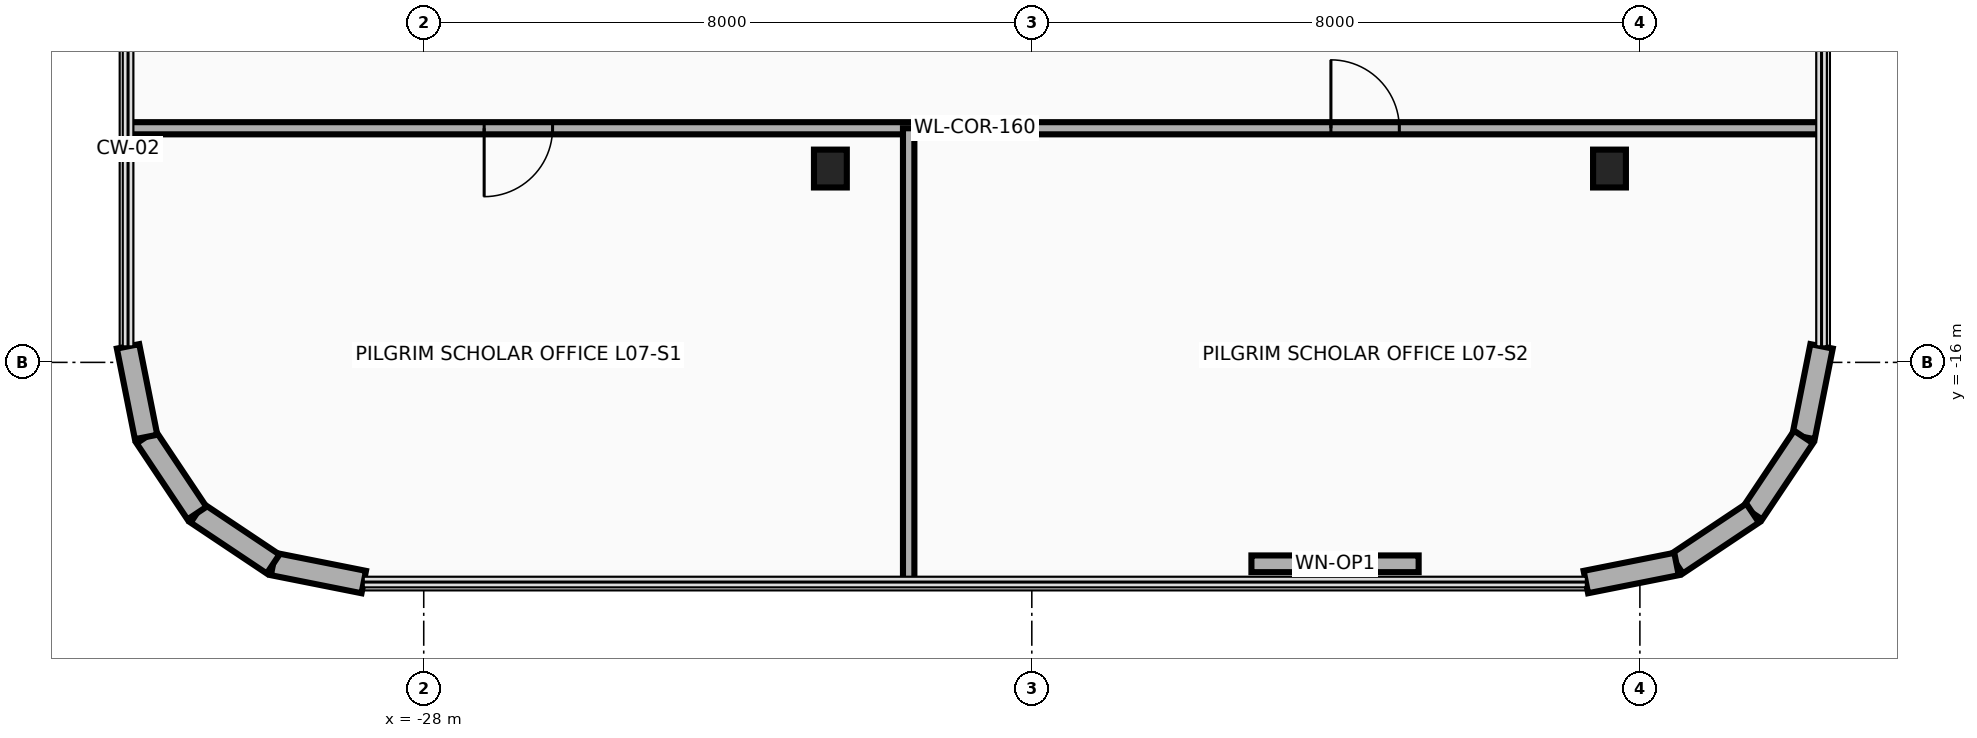
"""IFC4 building model, lengths in metres.
Left out: names, types, materials, properties, quantities, classifications, styles, units other than length and angle.
Written with IfcOpenShell. Run it as: python <this file> out.ifc"""

import sys

from ifc_helpers import new_model, si_unit, direction, frame, frame_2d, origin, origin_2d, place, context, subcontext, project, spatial, rectangle, i_section, extrude, source, transform, mapped, element, fill, save


model = new_model("IFC4")
c1 = context("Model", 3, precision=1e-05, world=origin(), true_north=direction((0.0, 1.0)))
c2 = subcontext(c1, "Body", "Model", "MODEL_VIEW")
j1 = project(units=[si_unit("LENGTHUNIT", "METRE"), si_unit("PLANEANGLEUNIT", "RADIAN")], contexts=[c1])
p1 = place(None, origin())
s1 = spatial("IfcSite", under=j1, at=p1, CompositionType="ELEMENT")
p2 = place(p1, origin())
s2 = spatial("IfcBuilding", under=s1, at=p2, CompositionType="ELEMENT")
p3 = place(p2, frame((0.0, 0.0, 33.4)))
s3 = spatial("IfcBuildingStorey", under=s2, at=p3, CompositionType="ELEMENT", Elevation=33.4)
m1 = source(origin(), c2, "Body", "SweptSolid", [
    extrude(i_section(OverallWidth=0.432, OverallDepth=0.498, WebThickness=0.056, FlangeThickness=0.089, at=origin_2d()), origin(), (0.0, 0.0, 1.0), 3.7),
])
for number, where, z_axis, x_axis in (
    (1, (-22.65, -13.45, 0.0), (0.0, 0.0, 1.0), (1.0, 0.0, 0.0)),
    (2, (-12.4, -13.45, 0.0), (0.0, 0.0, 1.0), (1.0, 0.0, 0.0)),
):
    element("IfcColumn", number, at=place(p3, frame(where, z_axis=z_axis, x_axis=x_axis)), inside=s3, PredefinedType="COLUMN", context=c2, shape_type="MappedRepresentation", body=[
        mapped(m1, transform((0.0, 0.0, 0.0), x_axis=(1.0, 0.0, 0.0), y_axis=(0.0, 1.0, 0.0), z_axis=(0.0, 0.0, 1.0), scale=1.0)),
    ])
p4 = place(p3, frame((-9.61, -15.789, 0.0), z_axis=(0.0, 0.0, 1.0), x_axis=(-0.194996050505, -0.980804027463, 0.0)))
e3 = element("IfcWall", 3, at=p4, inside=s3, PredefinedType="SOLIDWALL", context=c2, shape_type="SweptSolid", body=[
    extrude(rectangle(XDim=1.216, YDim=0.3, at=frame_2d((0.608, 0.0))), origin(), (0.0, 0.0, 1.0), 3.46),
])
for number, where, z_axis, x_axis in (
    (4, (-9.847, -16.982, 0.0), (0.0, 0.0, 1.0), (-0.556, -0.831, 0.0)),
    (5, (-10.517, -17.983, 0.0), (0.0, 0.0, 1.0), (-0.831, -0.556, 0.0)),
):
    element("IfcWall", number, at=place(p3, frame(where, z_axis=z_axis, x_axis=x_axis)), inside=s3, PredefinedType="SOLIDWALL", context=c2, shape_type="SweptSolid", body=[
        extrude(rectangle(XDim=1.205, YDim=0.3, at=frame_2d((0.603, 0.0))), origin(), (0.0, 0.0, 1.0), 3.46),
    ])
p5 = place(p3, frame((-11.518, -18.653, 0.0), z_axis=(0.0, 0.0, 1.0), x_axis=(-0.980804027463, -0.194996050505, 0.0)))
e6 = element("IfcWall", 6, at=p5, inside=s3, PredefinedType="SOLIDWALL", context=c2, shape_type="SweptSolid", body=[
    extrude(rectangle(XDim=1.216, YDim=0.3, at=frame_2d((0.608, 0.0))), origin(), (0.0, 0.0, 1.0), 3.46),
])
p6 = place(p3, frame((-14.911, -18.65, 0.0), z_axis=(0.0, 0.0, 1.0), x_axis=(-1.0, 0.0, 0.0)))
e7 = element("IfcWall", 7, at=p6, inside=s3, PredefinedType="SOLIDWALL", context=c2, shape_type="SweptSolid", body=[
    extrude(rectangle(XDim=2.2, YDim=0.22, at=frame_2d((1.1, 0.0))), origin(), (0.0, 0.0, 1.0), 3.46),
])
p7 = place(p6, frame((0.65, 0.0, 0.95)))
e8 = element("IfcOpeningElement", 8, at=p7, cuts=e7, PredefinedType="OPENING", context=c2, shape_type="SweptSolid", body=[
    extrude(rectangle(XDim=0.9, YDim=1.3, at=frame_2d((0.45, 0.65))), frame((0.0, 0.125, 0.0), z_axis=(0.0, -1.0, 0.0), x_axis=(1.0, 0.0, 0.0)), (0.0, 0.0, 1.0), 0.25),
])
p8 = place(p3, frame((-28.789, -18.89, 0.0), z_axis=(0.0, 0.0, 1.0), x_axis=(-0.980804027463, 0.194996050505, 0.0)))
e9 = element("IfcWall", 9, at=p8, inside=s3, PredefinedType="SOLIDWALL", context=c2, shape_type="SweptSolid", body=[
    extrude(rectangle(XDim=1.216, YDim=0.3, at=frame_2d((0.608, 0.0))), origin(), (0.0, 0.0, 1.0), 3.46),
])
for number, where, z_axis, x_axis in (
    (10, (-29.982, -18.653, 0.0), (0.0, 0.0, 1.0), (-0.831, 0.556, 0.0)),
    (11, (-30.983, -17.983, 0.0), (0.0, 0.0, 1.0), (-0.556, 0.831, 0.0)),
):
    element("IfcWall", number, at=place(p3, frame(where, z_axis=z_axis, x_axis=x_axis)), inside=s3, PredefinedType="SOLIDWALL", context=c2, shape_type="SweptSolid", body=[
        extrude(rectangle(XDim=1.205, YDim=0.3, at=frame_2d((0.603, 0.0))), origin(), (0.0, 0.0, 1.0), 3.46),
    ])
p9 = place(p3, frame((-31.653, -16.982, 0.0), z_axis=(0.0, 0.0, 1.0), x_axis=(-0.194996050505, 0.980804027463, 0.0)))
e12 = element("IfcWall", 12, at=p9, inside=s3, PredefinedType="SOLIDWALL", context=c2, shape_type="SweptSolid", body=[
    extrude(rectangle(XDim=1.216, YDim=0.3, at=frame_2d((0.608, 0.0))), origin(), (0.0, 0.0, 1.0), 3.46),
])
p10 = place(p3, frame((-31.89, -12.92, 0.0), z_axis=(0.0, 0.0, 1.0), x_axis=(1.0, 0.0, 0.0)))
e13 = element("IfcWall", 13, at=p10, inside=s3, PredefinedType="PARTITIONING", context=c2, shape_type="SweptSolid", body=[
    extrude(rectangle(XDim=22.28, YDim=0.16, at=frame_2d((11.14, 0.0))), origin(), (0.0, 0.0, 1.0), 2.834),
])
p11 = place(p10, frame((4.685, 0.0, 0.0)))
e14 = element("IfcOpeningElement", 14, at=p11, cuts=e13, PredefinedType="OPENING", context=c2, shape_type="SweptSolid", body=[
    extrude(rectangle(XDim=0.9, YDim=2.1, at=frame_2d((0.45, 1.05))), frame((0.0, 0.095, 0.0), z_axis=(0.0, -1.0, 0.0), x_axis=(1.0, 0.0, 0.0)), (0.0, 0.0, 1.0), 0.19),
])
p12 = place(p10, frame((15.825, 0.0, 0.0)))
e15 = element("IfcOpeningElement", 15, at=p12, cuts=e13, PredefinedType="OPENING", context=c2, shape_type="SweptSolid", body=[
    extrude(rectangle(XDim=0.9, YDim=2.1, at=frame_2d((0.45, 1.05))), frame((0.0, 0.095, 0.0), z_axis=(0.0, -1.0, 0.0), x_axis=(1.0, 0.0, 0.0)), (0.0, 0.0, 1.0), 0.19),
])
p13 = place(p3, frame((-21.62, -18.89, 0.0), z_axis=(0.0, 0.0, 1.0), x_axis=(0.0, 1.0, 0.0)))
e16 = element("IfcWall", 16, at=p13, inside=s3, PredefinedType="PARTITIONING", context=c2, shape_type="SweptSolid", body=[
    extrude(rectangle(XDim=5.97, YDim=0.15, at=frame_2d((2.985, 0.0))), origin(), (0.0, 0.0, 1.0), 2.896),
])
p14 = place(p7, origin())
e17 = element("IfcWindow", 17, at=p14, inside=s3, PartitioningType="SINGLE_PANEL", PredefinedType="WINDOW", context=c2, shape_type="SweptSolid", body=[
    extrude(rectangle(XDim=0.9, YDim=1.3, at=frame_2d((0.45, 0.65))), frame((0.0, 0.03, 0.0), z_axis=(0.0, -1.0, 0.0), x_axis=(1.0, 0.0, 0.0)), (0.0, 0.0, 1.0), 0.06),
])
fill(e8, e17)
p15 = place(p11, frame((0.9, 0.0, 0.0), z_axis=(0.0, 0.0, 1.0), x_axis=(-1.0, 0.0, 0.0)))
e18 = element("IfcDoor", 18, at=p15, inside=s3, OperationType="SINGLE_SWING_LEFT", PredefinedType="DOOR", context=c2, shape_type="SweptSolid", body=[
    extrude(rectangle(XDim=0.9, YDim=2.1, at=frame_2d((0.45, 1.05))), frame((0.0, 0.025, 0.0), z_axis=(0.0, -1.0, 0.0), x_axis=(1.0, 0.0, 0.0)), (0.0, 0.0, 1.0), 0.05),
])
fill(e14, e18)
p16 = place(p12, origin())
e19 = element("IfcDoor", 19, at=p16, inside=s3, OperationType="SINGLE_SWING_RIGHT", PredefinedType="DOOR", context=c2, shape_type="SweptSolid", body=[
    extrude(rectangle(XDim=0.9, YDim=2.1, at=frame_2d((0.45, 1.05))), frame((0.0, 0.025, 0.0), z_axis=(0.0, -1.0, 0.0), x_axis=(1.0, 0.0, 0.0)), (0.0, 0.0, 1.0), 0.05),
])
fill(e15, e19)
save(model, sys.argv[1])
